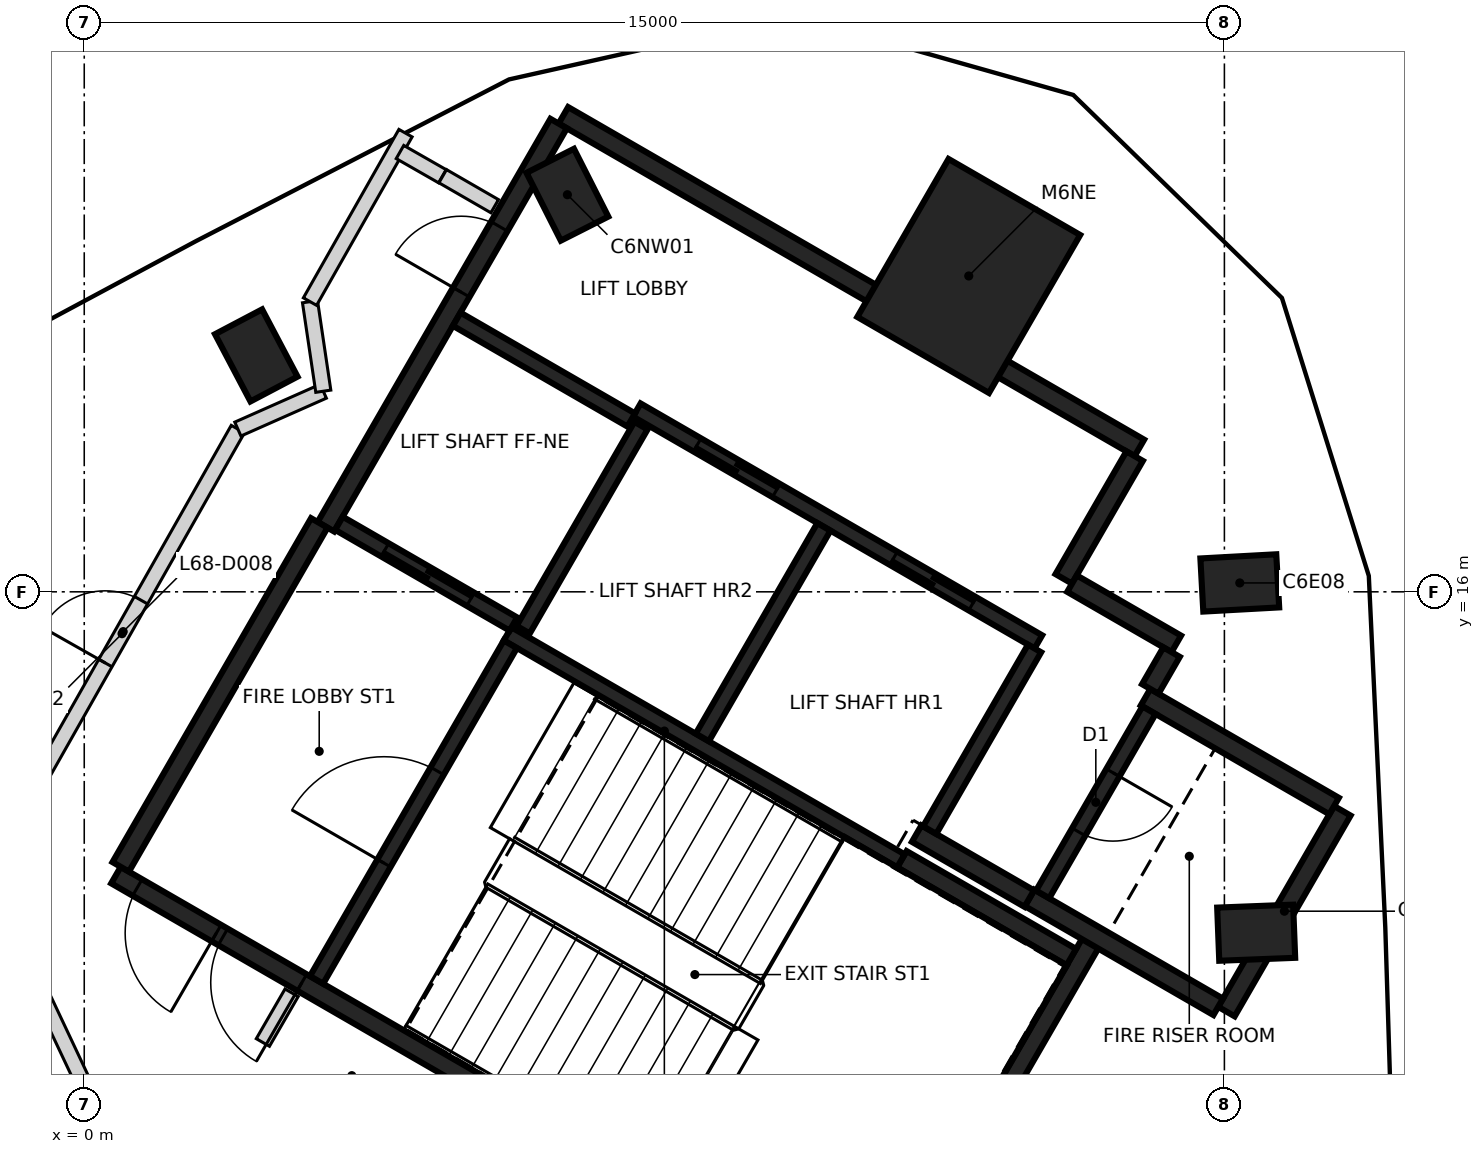
"""IFC4 building model, lengths in metres.
Left out: names, types, materials, properties, quantities, classifications, styles, units other than length and angle.
Written with IfcOpenShell. Run it as: python <this file> out.ifc"""

import sys

from ifc_helpers import new_model, si_unit, direction, frame, frame_2d, origin, origin_2d, place, context, subcontext, project, spatial, rectangle, extrude, element, fill, save


model = new_model("IFC4")
c1 = context("Model", 3, precision=1e-05, world=origin(), true_north=direction((0.0, 1.0)))
c2 = subcontext(c1, "Body", "Model", "MODEL_VIEW")
j1 = project(units=[si_unit("LENGTHUNIT", "METRE"), si_unit("PLANEANGLEUNIT", "RADIAN")], contexts=[c1])
p1 = place(None, origin())
s1 = spatial("IfcSite", under=j1, at=p1, CompositionType="ELEMENT")
p2 = place(p1, origin())
s2 = spatial("IfcBuilding", under=s1, at=p2, CompositionType="ELEMENT")
p3 = place(p2, frame((0.0, 0.0, 269.4)))
s3 = spatial("IfcBuildingStorey", under=s2, at=p3, CompositionType="ELEMENT", Elevation=269.4)
for number, where, z_axis, x_axis in (
    (1, (15.418, 11.515, -0.35), (0.0, 0.0, 1.0), (0.999, 0.039, 0.0)),
    (2, (15.202, 16.117, -0.35), (0.0, 0.0, 1.0), (0.998, 0.055, 0.0)),
    (3, (6.356, 21.224, -0.35), (0.0, 0.0, 1.0), (-0.452, 0.892, 0.0)),
    (4, (2.263, 19.11, -0.35), (0.0, 0.0, 1.0), (-0.466, 0.885, 0.0)),
):
    element("IfcColumn", number, at=place(p3, frame(where, z_axis=z_axis, x_axis=x_axis)), inside=s3, PredefinedType="COLUMN", context=c2, shape_type="SweptSolid", body=[
        extrude(rectangle(XDim=1.0, YDim=0.7, at=origin_2d()), origin(), (0.0, 0.0, 1.0), 3.6),
    ])
p4 = place(p3, frame((11.637, 20.155, -0.35), z_axis=(0.0, 0.0, 1.0), x_axis=(0.5, 0.866025403784, 0.0)))
e5 = element("IfcColumn", 5, at=p4, inside=s3, PredefinedType="COLUMN", context=c2, shape_type="SweptSolid", body=[
    extrude(rectangle(XDim=2.4, YDim=2.0, at=origin_2d()), origin(), (0.0, 0.0, 1.0), 3.6),
])
p5 = place(p3, frame((10.42, 6.498, 0.0), z_axis=(0.0, 0.0, 1.0), x_axis=(-0.866021906294, 0.500006057782, 0.0)))
e6 = element("IfcWall", 6, at=p5, inside=s3, PredefinedType="SHEAR", context=c2, shape_type="SweptSolid", body=[
    extrude(rectangle(XDim=11.55, YDim=0.25, at=frame_2d((5.775, 0.0))), origin(), (0.0, 0.0, 1.0), 3.25),
])
p6 = place(p5, frame((10.025, 0.0, 0.0)))
e7 = element("IfcOpeningElement", 7, at=p6, cuts=e6, PredefinedType="OPENING", context=c2, shape_type="SweptSolid", body=[
    extrude(rectangle(XDim=1.2, YDim=2.1, at=frame_2d((0.6, 1.05))), frame((0.0, 0.135, 0.0), z_axis=(0.0, -1.0, 0.0), x_axis=(1.0, 0.0, 0.0)), (0.0, 0.0, 1.0), 0.27),
])
p7 = place(p5, frame((8.725, 0.0, 0.0)))
e8 = element("IfcOpeningElement", 8, at=p7, cuts=e6, PredefinedType="OPENING", context=c2, shape_type="SweptSolid", body=[
    extrude(rectangle(XDim=1.2, YDim=2.1, at=frame_2d((0.6, 1.05))), frame((0.0, 0.135, 0.0), z_axis=(0.0, -1.0, 0.0), x_axis=(1.0, 0.0, 0.0)), (0.0, 0.0, 1.0), 0.27),
])
p8 = place(p3, frame((6.304, 22.269, 0.0), z_axis=(0.0, 0.0, 1.0), x_axis=(0.866022959057, -0.500004234368, 0.0)))
e9 = element("IfcWall", 9, at=p8, inside=s3, PredefinedType="SHEAR", context=c2, shape_type="SweptSolid", body=[
    extrude(rectangle(XDim=8.75, YDim=0.25, at=frame_2d((4.375, 0.0))), origin(), (0.0, 0.0, 1.0), 3.25),
])
p9 = place(p3, frame((3.179, 16.856, 0.0), z_axis=(0.0, 0.0, 1.0), x_axis=(0.500001955336, 0.866024274868, 0.0)))
e10 = element("IfcWall", 10, at=p9, inside=s3, PredefinedType="SHEAR", context=c2, shape_type="SweptSolid", body=[
    extrude(rectangle(XDim=6.125, YDim=0.25, at=frame_2d((3.062, 0.0))), origin(), (0.0, 0.0, 1.0), 3.25),
])
p10 = place(p9, frame((3.563, 0.0, 0.0)))
e11 = element("IfcOpeningElement", 11, at=p10, cuts=e10, PredefinedType="OPENING", context=c2, shape_type="SweptSolid", body=[
    extrude(rectangle(XDim=1.0, YDim=2.1, at=frame_2d((0.5, 1.05))), frame((0.0, 0.135, 0.0), z_axis=(0.0, -1.0, 0.0), x_axis=(1.0, 0.0, 0.0)), (0.0, 0.0, 1.0), 0.27),
])
p11 = place(p3, frame((0.48, 12.381, 0.0), z_axis=(0.0, 0.0, 1.0), x_axis=(0.49999885962, 0.866026062182, 0.0)))
e12 = element("IfcWall", 12, at=p11, inside=s3, PredefinedType="SHEAR", context=c2, shape_type="SweptSolid", body=[
    extrude(rectangle(XDim=5.225, YDim=0.25, at=frame_2d((2.612, 0.0))), origin(), (0.0, 0.0, 1.0), 3.25),
])
p12 = place(p3, frame((13.238, 11.378, 0.0), z_axis=(0.0, 0.0, 1.0), x_axis=(-0.500008851346, -0.866020293397, 0.0)))
e13 = element("IfcWall", 13, at=p12, inside=s3, PredefinedType="SHEAR", context=c2, shape_type="SweptSolid", body=[
    extrude(rectangle(XDim=5.51, YDim=0.25, at=frame_2d((2.755, 0.0))), origin(), (0.0, 0.0, 1.0), 3.25),
])
p13 = place(p3, frame((16.552, 13.119, 0.0), z_axis=(0.0, 0.0, 1.0), x_axis=(-0.499978833458, -0.866037623948, 0.0)))
e14 = element("IfcWall", 14, at=p13, inside=s3, PredefinedType="SHEAR", context=c2, shape_type="SweptSolid", body=[
    extrude(rectangle(XDim=3.05, YDim=0.25, at=frame_2d((1.525, 0.0))), origin(), (0.0, 0.0, 1.0), 3.25),
])
p14 = place(p3, frame((14.918, 10.54, 0.0), z_axis=(0.0, 0.0, 1.0), x_axis=(-0.866063538972, 0.499933942099, 0.0)))
e15 = element("IfcWall", 15, at=p14, inside=s3, PredefinedType="SHEAR", context=c2, shape_type="SweptSolid", body=[
    extrude(rectangle(XDim=2.865, YDim=0.25, at=frame_2d((1.432, 0.0))), origin(), (0.0, 0.0, 1.0), 3.25),
])
p15 = place(p3, frame((13.963, 14.614, 0.0), z_axis=(0.0, 0.0, 1.0), x_axis=(0.866042235819, -0.499970844928, 0.0)))
e16 = element("IfcWall", 16, at=p15, inside=s3, PredefinedType="SHEAR", context=c2, shape_type="SweptSolid", body=[
    extrude(rectangle(XDim=2.865, YDim=0.25, at=frame_2d((1.432, 0.0))), origin(), (0.0, 0.0, 1.0), 3.25),
])
p16 = place(p3, frame((10.757, 12.481, 0.0), z_axis=(0.0, 0.0, 1.0), x_axis=(0.866022940537, -0.500004266446, 0.0)))
e17 = element("IfcWall", 17, at=p16, inside=s3, PredefinedType="SHEAR", context=c2, shape_type="SweptSolid", body=[
    extrude(rectangle(XDim=2.575, YDim=0.25, at=frame_2d((1.287, 0.0))), origin(), (0.0, 0.0, 1.0), 3.25),
])
p17 = place(p3, frame((13.819, 17.785, 0.0), z_axis=(0.0, 0.0, 1.0), x_axis=(-0.500039802285, -0.866002422705, 0.0)))
e18 = element("IfcWall", 18, at=p17, inside=s3, PredefinedType="SHEAR", context=c2, shape_type="SweptSolid", body=[
    extrude(rectangle(XDim=1.865, YDim=0.25, at=frame_2d((0.932, 0.0))), origin(), (0.0, 0.0, 1.0), 3.25),
])
p18 = place(p3, frame((12.433, 11.964, 0.0), z_axis=(0.0, 0.0, 1.0), x_axis=(-0.866038183914, 0.499977863513, 0.0)))
e19 = element("IfcWall", 19, at=p18, inside=s3, PredefinedType="SHEAR", context=c2, shape_type="SweptSolid", body=[
    extrude(rectangle(XDim=1.71, YDim=0.25, at=frame_2d((0.855, 0.0))), origin(), (0.0, 0.0, 1.0), 3.25),
])
p19 = place(p3, frame((12.995, 16.108, 0.0), z_axis=(0.0, 0.0, 1.0), x_axis=(0.866044474677, -0.49996696679, 0.0)))
e20 = element("IfcWall", 20, at=p19, inside=s3, PredefinedType="SHEAR", context=c2, shape_type="SweptSolid", body=[
    extrude(rectangle(XDim=1.584, YDim=0.25, at=frame_2d((0.792, 0.0))), origin(), (0.0, 0.0, 1.0), 3.25),
])
p20 = place(p3, frame((14.305, 15.207, 0.0), z_axis=(0.0, 0.0, 1.0), x_axis=(-0.499848422343, -0.866112899501, 0.0)))
e21 = element("IfcWall", 21, at=p20, inside=s3, PredefinedType="SHEAR", context=c2, shape_type="SweptSolid", body=[
    extrude(rectangle(XDim=0.559, YDim=0.25, at=frame_2d((0.28, 0.0))), origin(), (0.0, 0.0, 1.0), 3.25),
])
p21 = place(p3, frame((12.552, 15.342, 0.0), z_axis=(0.0, 0.0, 1.0), x_axis=(-0.866030299012, 0.499991521122, 0.0)))
e22 = element("IfcWall", 22, at=p21, inside=s3, PredefinedType="SHEAR", context=c2, shape_type="SweptSolid", body=[
    extrude(rectangle(XDim=6.1, YDim=0.2, at=frame_2d((3.05, 0.0))), origin(), (0.0, 0.0, 1.0), 3.25),
])
p22 = place(p21, frame((1.0, 0.0, 0.0)))
e23 = element("IfcOpeningElement", 23, at=p22, cuts=e22, PredefinedType="OPENING", context=c2, shape_type="SweptSolid", body=[
    extrude(rectangle(XDim=1.2, YDim=2.1, at=frame_2d((0.6, 1.05))), frame((0.0, 0.11, 0.0), z_axis=(0.0, -1.0, 0.0), x_axis=(1.0, 0.0, 0.0)), (0.0, 0.0, 1.0), 0.22),
])
p23 = place(p21, frame((3.982, 0.0, 0.0)))
e24 = element("IfcOpeningElement", 24, at=p23, cuts=e22, PredefinedType="OPENING", context=c2, shape_type="SweptSolid", body=[
    extrude(rectangle(XDim=1.2, YDim=2.1, at=frame_2d((0.6, 1.05))), frame((0.0, 0.11, 0.0), z_axis=(0.0, -1.0, 0.0), x_axis=(1.0, 0.0, 0.0)), (0.0, 0.0, 1.0), 0.22),
])
p24 = place(p3, frame((10.743, 12.46, 0.0), z_axis=(0.0, 0.0, 1.0), x_axis=(-0.866018848283, 0.500011354289, 0.0)))
e25 = element("IfcWall", 25, at=p24, inside=s3, PredefinedType="SHEAR", context=c2, shape_type="SweptSolid", body=[
    extrude(rectangle(XDim=5.974, YDim=0.2, at=frame_2d((2.987, 0.0))), origin(), (0.0, 0.0, 1.0), 3.25),
])
p25 = place(p3, frame((3.057, 10.895, 0.0), z_axis=(0.0, 0.0, 1.0), x_axis=(0.500027839223, 0.866009330205, 0.0)))
e26 = element("IfcWall", 26, at=p25, inside=s3, PredefinedType="SHEAR", context=c2, shape_type="SweptSolid", body=[
    extrude(rectangle(XDim=5.098, YDim=0.2, at=frame_2d((2.549, 0.0))), origin(), (0.0, 0.0, 1.0), 3.25),
])
p26 = place(p25, frame((1.774, 0.0, 0.0)))
e27 = element("IfcOpeningElement", 27, at=p26, cuts=e26, PredefinedType="OPENING", context=c2, shape_type="SweptSolid", body=[
    extrude(rectangle(XDim=1.4, YDim=2.1, at=frame_2d((0.7, 1.05))), frame((0.0, 0.11, 0.0), z_axis=(0.0, -1.0, 0.0), x_axis=(1.0, 0.0, 0.0)), (0.0, 0.0, 1.0), 0.22),
])
p27 = place(p3, frame((8.132, 14.084, 0.0), z_axis=(0.0, 0.0, 1.0), x_axis=(0.500030834389, 0.86600760081, 0.0)))
e28 = element("IfcWall", 28, at=p27, inside=s3, PredefinedType="SHEAR", context=c2, shape_type="SweptSolid", body=[
    extrude(rectangle(XDim=3.198, YDim=0.2, at=frame_2d((1.599, 0.0))), origin(), (0.0, 0.0, 1.0), 3.25),
])
p28 = place(p3, frame((14.008, 14.442, 0.0), z_axis=(0.0, 0.0, 1.0), x_axis=(-0.499986818241, -0.866033014143, 0.0)))
e29 = element("IfcWall", 29, at=p28, inside=s3, PredefinedType="SHEAR", context=c2, shape_type="SweptSolid", body=[
    extrude(rectangle(XDim=2.798, YDim=0.2, at=frame_2d((1.399, 0.0))), origin(), (0.0, 0.0, 1.0), 3.25),
])
p29 = place(p28, frame((0.949, 0.0, 0.0)))
e30 = element("IfcOpeningElement", 30, at=p29, cuts=e29, PredefinedType="OPENING", context=c2, shape_type="SweptSolid", body=[
    extrude(rectangle(XDim=0.9, YDim=2.1, at=frame_2d((0.45, 1.05))), frame((0.0, 0.11, 0.0), z_axis=(0.0, -1.0, 0.0), x_axis=(1.0, 0.0, 0.0)), (0.0, 0.0, 1.0), 0.22),
])
p30 = place(p3, frame((12.502, 15.255, 0.0), z_axis=(0.0, 0.0, 1.0), x_axis=(-0.499965018551, -0.866045599391, 0.0)))
e31 = element("IfcWall", 31, at=p30, inside=s3, PredefinedType="SHEAR", context=c2, shape_type="SweptSolid", body=[
    extrude(rectangle(XDim=2.759, YDim=0.2, at=frame_2d((1.379, 0.0))), origin(), (0.0, 0.0, 1.0), 3.25),
])
p31 = place(p3, frame((7.324, 18.187, 0.0), z_axis=(0.0, 0.0, 1.0), x_axis=(-0.499967891604, -0.866043940782, 0.0)))
e32 = element("IfcWall", 32, at=p31, inside=s3, PredefinedType="SHEAR", context=c2, shape_type="SweptSolid", body=[
    extrude(rectangle(XDim=3.1, YDim=0.2, at=frame_2d((1.55, 0.0))), origin(), (0.0, 0.0, 1.0), 3.25),
])
p32 = place(p3, frame((5.646, 15.576, 0.0), z_axis=(0.0, 0.0, 1.0), x_axis=(-0.866018407898, 0.500012117035, 0.0)))
e33 = element("IfcWall", 33, at=p32, inside=s3, PredefinedType="SHEAR", context=c2, shape_type="SweptSolid", body=[
    extrude(rectangle(XDim=2.651, YDim=0.2, at=frame_2d((1.325, 0.0))), origin(), (0.0, 0.0, 1.0), 3.25),
])
p33 = place(p32, frame((0.652, 0.0, 0.0)))
e34 = element("IfcOpeningElement", 34, at=p33, cuts=e33, PredefinedType="OPENING", context=c2, shape_type="SweptSolid", body=[
    extrude(rectangle(XDim=1.3, YDim=2.1, at=frame_2d((0.65, 1.05))), frame((0.0, 0.11, 0.0), z_axis=(0.0, -1.0, 0.0), x_axis=(1.0, 0.0, 0.0)), (0.0, 0.0, 1.0), 0.22),
])
p34 = place(p3, frame((7.196, 18.26, 0.0), z_axis=(0.0, 0.0, 1.0), x_axis=(-0.866018407898, 0.500012117035, 0.0)))
e35 = element("IfcWall", 35, at=p34, inside=s3, PredefinedType="SHEAR", context=c2, shape_type="SweptSolid", body=[
    extrude(rectangle(XDim=2.651, YDim=0.2, at=frame_2d((1.325, 0.0))), origin(), (0.0, 0.0, 1.0), 3.25),
])
p35 = place(p3, frame((-1.06, 11.76, 0.0), z_axis=(0.0, 0.0, 1.0), x_axis=(0.426549824954, -0.904464066081, 0.0)))
e36 = element("IfcWall", 36, at=p35, inside=s3, PredefinedType="PARTITIONING", context=c2, shape_type="SweptSolid", body=[
    extrude(rectangle(XDim=5.747, YDim=0.2, at=frame_2d((2.873, 0.0))), origin(), (0.0, 0.0, 1.0), 3.25),
])
p36 = place(p3, frame((-1.027, 12.757, 0.0), z_axis=(0.0, 0.0, 1.0), x_axis=(0.492663063759, 0.870220147783, 0.0)))
e37 = element("IfcWall", 37, at=p36, inside=s3, PredefinedType="PARTITIONING", context=c2, shape_type="SweptSolid", body=[
    extrude(rectangle(XDim=6.187, YDim=0.2, at=frame_2d((3.094, 0.0))), origin(), (0.0, 0.0, 1.0), 3.25),
])
p37 = place(p36, frame((2.65, 0.0, 0.0)))
e38 = element("IfcOpeningElement", 38, at=p37, cuts=e37, PredefinedType="OPENING", context=c2, shape_type="SweptSolid", body=[
    extrude(rectangle(XDim=0.95, YDim=2.1, at=frame_2d((0.475, 1.05))), frame((0.0, 0.11, 0.0), z_axis=(0.0, -1.0, 0.0), x_axis=(1.0, 0.0, 0.0)), (0.0, 0.0, 1.0), 0.22),
])
p38 = place(p3, frame((2.021, 18.141, 0.0), z_axis=(0.0, 0.0, 1.0), x_axis=(0.914343087003, 0.404940389748, 0.0)))
e39 = element("IfcWall", 39, at=p38, inside=s3, PredefinedType="PARTITIONING", context=c2, shape_type="SweptSolid", body=[
    extrude(rectangle(XDim=1.229, YDim=0.2, at=frame_2d((0.615, 0.0))), origin(), (0.0, 0.0, 1.0), 3.25),
])
p39 = place(p3, frame((2.35, 10.071, 0.0), z_axis=(0.0, 0.0, 1.0), x_axis=(0.500309905322, 0.865846405916, 0.0)))
e40 = element("IfcWall", 40, at=p39, inside=s3, PredefinedType="PARTITIONING", context=c2, shape_type="SweptSolid", body=[
    extrude(rectangle(XDim=0.755, YDim=0.2, at=frame_2d((0.378, 0.0))), origin(), (0.0, 0.0, 1.0), 3.25),
])
p40 = place(p3, frame((2.97, 19.817, 0.0), z_axis=(0.0, 0.0, 1.0), x_axis=(0.146986994932, -0.989138424752, 0.0)))
e41 = element("IfcWall", 41, at=p40, inside=s3, PredefinedType="PARTITIONING", context=c2, shape_type="SweptSolid", body=[
    extrude(rectangle(XDim=1.191, YDim=0.2, at=frame_2d((0.595, 0.0))), origin(), (0.0, 0.0, 1.0), 2.35),
])
p41 = place(p3, frame((2.97, 19.818, 0.0), z_axis=(0.0, 0.0, 1.0), x_axis=(0.493215654548, 0.86990707441, 0.0)))
e42 = element("IfcWall", 42, at=p41, inside=s3, PredefinedType="PARTITIONING", context=c2, shape_type="SweptSolid", body=[
    extrude(rectangle(XDim=2.548, YDim=0.2, at=frame_2d((1.274, 0.0))), origin(), (0.0, 0.0, 1.0), 3.25),
])
p42 = place(p3, frame((4.154, 21.786, 0.0), z_axis=(0.0, 0.0, 1.0), x_axis=(0.868196374619, -0.496220772539, 0.0)))
e43 = element("IfcWall", 43, at=p42, inside=s3, PredefinedType="PARTITIONING", context=c2, shape_type="SweptSolid", body=[
    extrude(rectangle(XDim=0.643, YDim=0.2, at=frame_2d((0.321, 0.0))), origin(), (0.0, 0.0, 1.0), 3.25),
])
p43 = place(p3, frame((4.716, 21.468, 0.0), z_axis=(0.0, 0.0, 1.0), x_axis=(0.865912682783, -0.500195187698, 0.0)))
e44 = element("IfcWall", 44, at=p43, inside=s3, PredefinedType="PARTITIONING", context=c2, shape_type="SweptSolid", body=[
    extrude(rectangle(XDim=0.79, YDim=0.2, at=frame_2d((0.395, 0.0))), origin(), (0.0, 0.0, 1.0), 3.25),
])
p44 = place(p33, origin())
e45 = element("IfcDoor", 45, at=p44, inside=s3, OperationType="SLIDING_TO_LEFT", PredefinedType="DOOR", context=c2, shape_type="SweptSolid", body=[
    extrude(rectangle(XDim=1.3, YDim=2.1, at=frame_2d((0.65, 1.05))), frame((0.0, 0.025, 0.0), z_axis=(0.0, -1.0, 0.0), x_axis=(1.0, 0.0, 0.0)), (0.0, 0.0, 1.0), 0.05),
])
fill(e34, e45)
p45 = place(p22, origin())
e46 = element("IfcDoor", 46, at=p45, inside=s3, OperationType="DOUBLE_DOOR_SLIDING", PredefinedType="DOOR", context=c2, shape_type="SweptSolid", body=[
    extrude(rectangle(XDim=1.2, YDim=2.1, at=frame_2d((0.6, 1.05))), frame((0.0, 0.025, 0.0), z_axis=(0.0, -1.0, 0.0), x_axis=(1.0, 0.0, 0.0)), (0.0, 0.0, 1.0), 0.05),
])
fill(e23, e46)
p46 = place(p23, origin())
e47 = element("IfcDoor", 47, at=p46, inside=s3, OperationType="DOUBLE_DOOR_SLIDING", PredefinedType="DOOR", context=c2, shape_type="SweptSolid", body=[
    extrude(rectangle(XDim=1.2, YDim=2.1, at=frame_2d((0.6, 1.05))), frame((0.0, 0.025, 0.0), z_axis=(0.0, -1.0, 0.0), x_axis=(1.0, 0.0, 0.0)), (0.0, 0.0, 1.0), 0.05),
])
fill(e24, e47)
p47 = place(p10, origin())
e48 = element("IfcDoor", 48, at=p47, inside=s3, OperationType="SINGLE_SWING_LEFT", PredefinedType="DOOR", context=c2, shape_type="SweptSolid", body=[
    extrude(rectangle(XDim=1.0, YDim=2.1, at=frame_2d((0.5, 1.05))), frame((0.0, 0.025, 0.0), z_axis=(0.0, -1.0, 0.0), x_axis=(1.0, 0.0, 0.0)), (0.0, 0.0, 1.0), 0.05),
])
fill(e11, e48)
p48 = place(p6, origin())
e49 = element("IfcDoor", 49, at=p48, inside=s3, OperationType="SINGLE_SWING_LEFT", PredefinedType="DOOR", context=c2, shape_type="SweptSolid", body=[
    extrude(rectangle(XDim=1.2, YDim=2.1, at=frame_2d((0.6, 1.05))), frame((0.0, 0.025, 0.0), z_axis=(0.0, -1.0, 0.0), x_axis=(1.0, 0.0, 0.0)), (0.0, 0.0, 1.0), 0.05),
])
fill(e7, e49)
p49 = place(p7, origin())
e50 = element("IfcDoor", 50, at=p49, inside=s3, OperationType="SINGLE_SWING_RIGHT", PredefinedType="DOOR", context=c2, shape_type="SweptSolid", body=[
    extrude(rectangle(XDim=1.2, YDim=2.1, at=frame_2d((0.6, 1.05))), frame((0.0, 0.025, 0.0), z_axis=(0.0, -1.0, 0.0), x_axis=(1.0, 0.0, 0.0)), (0.0, 0.0, 1.0), 0.05),
])
fill(e8, e50)
p50 = place(p26, origin())
e51 = element("IfcDoor", 51, at=p50, inside=s3, OperationType="SINGLE_SWING_LEFT", PredefinedType="DOOR", context=c2, shape_type="SweptSolid", body=[
    extrude(rectangle(XDim=1.4, YDim=2.1, at=frame_2d((0.7, 1.05))), frame((0.0, 0.025, 0.0), z_axis=(0.0, -1.0, 0.0), x_axis=(1.0, 0.0, 0.0)), (0.0, 0.0, 1.0), 0.05),
])
fill(e27, e51)
p51 = place(p29, origin())
e52 = element("IfcDoor", 52, at=p51, inside=s3, OperationType="SINGLE_SWING_RIGHT", PredefinedType="DOOR", context=c2, shape_type="SweptSolid", body=[
    extrude(rectangle(XDim=0.9, YDim=2.1, at=frame_2d((0.45, 1.05))), frame((0.0, 0.025, 0.0), z_axis=(0.0, -1.0, 0.0), x_axis=(1.0, 0.0, 0.0)), (0.0, 0.0, 1.0), 0.05),
])
fill(e30, e52)
p52 = place(p37, origin())
e53 = element("IfcDoor", 53, at=p52, inside=s3, OperationType="SINGLE_SWING_LEFT", PredefinedType="DOOR", context=c2, shape_type="SweptSolid", body=[
    extrude(rectangle(XDim=0.95, YDim=2.1, at=frame_2d((0.475, 1.05))), frame((0.0, 0.025, 0.0), z_axis=(0.0, -1.0, 0.0), x_axis=(1.0, 0.0, 0.0)), (0.0, 0.0, 1.0), 0.05),
])
fill(e38, e53)
save(model, sys.argv[1])
